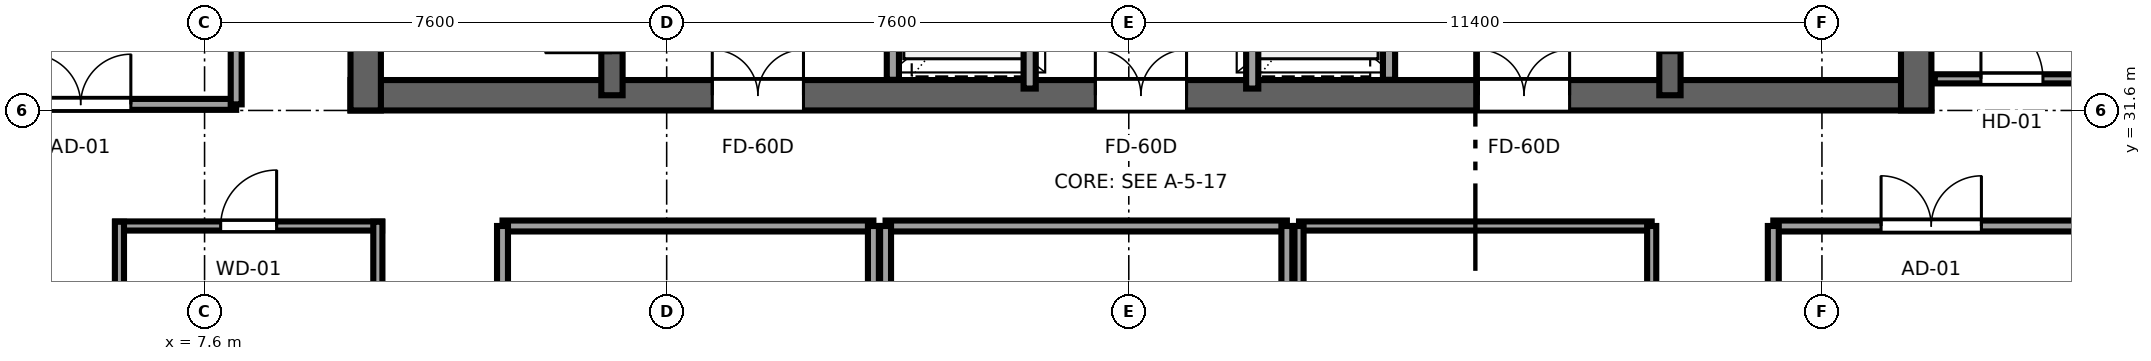
"""IFC4 building model, lengths in metres.
Left out: names, types, materials, properties, quantities, classifications, styles, units other than length and angle.
Written with IfcOpenShell. Run it as: python <this file> out.ifc"""

import sys

from ifc_helpers import new_model, si_unit, direction, frame, frame_2d, origin, place, context, subcontext, project, spatial, rectangle, extrude, source, transform, mapped, element, fill, save


model = new_model("IFC4")
c1 = context("Model", 3, precision=1e-05, world=origin(), true_north=direction((0.0, 1.0)))
c2 = subcontext(c1, "Body", "Model", "MODEL_VIEW")
j1 = project(units=[si_unit("LENGTHUNIT", "METRE"), si_unit("PLANEANGLEUNIT", "RADIAN")], contexts=[c1])
p1 = place(None, origin())
s1 = spatial("IfcSite", under=j1, at=p1, CompositionType="ELEMENT")
p2 = place(p1, origin())
s2 = spatial("IfcBuilding", under=s1, at=p2, CompositionType="ELEMENT")
p3 = place(p2, frame((0.0, 0.0, 259.4)))
s3 = spatial("IfcBuildingStorey", under=s2, at=p3, CompositionType="ELEMENT", Elevation=259.4)
p4 = place(p3, frame((10.0, 31.85, 0.0), z_axis=(0.0, 0.0, 1.0), x_axis=(1.0, 0.0, 0.0)))
e1 = element("IfcWall", 1, at=p4, inside=s3, PredefinedType="SHEAR", context=c2, shape_type="SweptSolid", body=[
    extrude(rectangle(XDim=26.0, YDim=0.5, at=frame_2d((13.0, 0.0))), origin(), (0.0, 0.0, 1.0), 3.55),
])
p5 = place(p4, frame((7.45, 0.0, 0.0), z_axis=(0.0, 0.0, 1.0), x_axis=(-1.0, 0.0, 0.0)))
e2 = element("IfcOpeningElement", 2, at=p5, cuts=e1, PredefinedType="OPENING", context=c2, shape_type="SweptSolid", body=[
    extrude(rectangle(XDim=1.5, YDim=2.04, at=frame_2d((0.75, 1.02))), frame((0.0, 0.26, 0.0), z_axis=(0.0, -1.0, 0.0), x_axis=(1.0, 0.0, 0.0)), (0.0, 0.0, 1.0), 0.52),
])
p6 = place(p4, frame((13.75, 0.0, 0.0), z_axis=(0.0, 0.0, 1.0), x_axis=(-1.0, 0.0, 0.0)))
e3 = element("IfcOpeningElement", 3, at=p6, cuts=e1, PredefinedType="OPENING", context=c2, shape_type="SweptSolid", body=[
    extrude(rectangle(XDim=1.5, YDim=2.04, at=frame_2d((0.75, 1.02))), frame((0.0, 0.26, 0.0), z_axis=(0.0, -1.0, 0.0), x_axis=(1.0, 0.0, 0.0)), (0.0, 0.0, 1.0), 0.52),
])
p7 = place(p4, frame((20.05, 0.0, 0.0), z_axis=(0.0, 0.0, 1.0), x_axis=(-1.0, 0.0, 0.0)))
e4 = element("IfcOpeningElement", 4, at=p7, cuts=e1, PredefinedType="OPENING", context=c2, shape_type="SweptSolid", body=[
    extrude(rectangle(XDim=1.5, YDim=2.04, at=frame_2d((0.75, 1.02))), frame((0.0, 0.26, 0.0), z_axis=(0.0, -1.0, 0.0), x_axis=(1.0, 0.0, 0.0)), (0.0, 0.0, 1.0), 0.52),
])
for number, where, z_axis, x_axis in (
    (5, (10.25, 31.6, 0.0), (0.0, 0.0, 1.0), (0.0, 1.0, 0.0)),
    (6, (35.75, 31.6, 0.0), (0.0, 0.0, 1.0), (0.0, 1.0, 0.0)),
):
    element("IfcWall", number, at=place(p3, frame(where, z_axis=z_axis, x_axis=x_axis)), inside=s3, PredefinedType="SHEAR", context=c2, shape_type="SweptSolid", body=[
        extrude(rectangle(XDim=13.6, YDim=0.5, at=frame_2d((6.8, 0.0))), origin(), (0.0, 0.0, 1.0), 3.55),
    ])
p8 = place(p3, frame((14.3, 31.85, 0.0), z_axis=(0.0, 0.0, 1.0), x_axis=(0.0, 1.0, 0.0)))
e7 = element("IfcWall", 7, at=p8, inside=s3, PredefinedType="SHEAR", context=c2, shape_type="SweptSolid", body=[
    extrude(rectangle(XDim=13.1, YDim=0.35, at=frame_2d((6.55, 0.0))), origin(), (0.0, 0.0, 1.0), 3.55),
])
p9 = place(p8, frame((0.7, 0.0, 0.0)))
e8 = element("IfcOpeningElement", 8, at=p9, cuts=e7, PredefinedType="OPENING", context=c2, shape_type="SweptSolid", body=[
    extrude(rectangle(XDim=1.1, YDim=2.12, at=frame_2d((0.55, 1.06))), frame((0.0, 0.185, 0.0), z_axis=(0.0, -1.0, 0.0), x_axis=(1.0, 0.0, 0.0)), (0.0, 0.0, 1.0), 0.37),
])
p10 = place(p3, frame((31.7, 31.85, 0.0), z_axis=(0.0, 0.0, 1.0), x_axis=(0.0, 1.0, 0.0)))
e9 = element("IfcWall", 9, at=p10, inside=s3, PredefinedType="SHEAR", context=c2, shape_type="SweptSolid", body=[
    extrude(rectangle(XDim=13.1, YDim=0.35, at=frame_2d((6.55, 0.0))), origin(), (0.0, 0.0, 1.0), 3.55),
])
p11 = place(p10, frame((1.8, 0.0, 0.0), z_axis=(0.0, 0.0, 1.0), x_axis=(-1.0, 0.0, 0.0)))
e10 = element("IfcOpeningElement", 10, at=p11, cuts=e9, PredefinedType="OPENING", context=c2, shape_type="SweptSolid", body=[
    extrude(rectangle(XDim=1.1, YDim=2.12, at=frame_2d((0.55, 1.06))), frame((0.0, 0.185, 0.0), z_axis=(0.0, -1.0, 0.0), x_axis=(1.0, 0.0, 0.0)), (0.0, 0.0, 1.0), 0.37),
])
for number, where, z_axis, x_axis in (
    (11, (18.92, 32.104, 0.0), (0.0, 0.0, 1.0), (0.0, 1.0, 0.0)),
    (12, (27.08, 32.104, 0.0), (0.0, 0.0, 1.0), (0.0, 1.0, 0.0)),
):
    element("IfcWall", number, at=place(p3, frame(where, z_axis=z_axis, x_axis=x_axis)), inside=s3, PredefinedType="SOLIDWALL", context=c2, shape_type="SweptSolid", body=[
        extrude(rectangle(XDim=4.046, YDim=0.2, at=frame_2d((2.023, 0.0))), origin(), (0.0, 0.0, 1.0), 3.37),
    ])
p12 = place(p3, frame((21.17, 31.96, 0.0), z_axis=(0.0, 0.0, 1.0), x_axis=(0.0, 1.0, 0.0)))
e13 = element("IfcWall", 13, at=p12, inside=s3, PredefinedType="SOLIDWALL", context=c2, shape_type="SweptSolid", body=[
    extrude(rectangle(XDim=5.08, YDim=0.2, at=frame_2d((2.54, 0.0))), origin(), (0.0, 0.0, 1.0), 3.37),
])
p13 = place(p12, frame((0.74, 0.0, 0.0)))
e14 = element("IfcOpeningElement", 14, at=p13, cuts=e13, PredefinedType="OPENING", context=c2, shape_type="SweptSolid", body=[
    extrude(rectangle(XDim=1.1, YDim=2.12, at=frame_2d((0.55, 1.06))), frame((0.0, 0.11, 0.0), z_axis=(0.0, -1.0, 0.0), x_axis=(1.0, 0.0, 0.0)), (0.0, 0.0, 1.0), 0.22),
])
p14 = place(p12, frame((3.24, 0.0, 0.0)))
e15 = element("IfcOpeningElement", 15, at=p14, cuts=e13, PredefinedType="OPENING", context=c2, shape_type="SweptSolid", body=[
    extrude(rectangle(XDim=1.1, YDim=2.12, at=frame_2d((0.55, 1.06))), frame((0.0, 0.11, 0.0), z_axis=(0.0, -1.0, 0.0), x_axis=(1.0, 0.0, 0.0)), (0.0, 0.0, 1.0), 0.22),
])
p15 = place(p3, frame((24.83, 31.96, 0.0), z_axis=(0.0, 0.0, 1.0), x_axis=(0.0, 1.0, 0.0)))
e16 = element("IfcWall", 16, at=p15, inside=s3, PredefinedType="SOLIDWALL", context=c2, shape_type="SweptSolid", body=[
    extrude(rectangle(XDim=5.08, YDim=0.2, at=frame_2d((2.54, 0.0))), origin(), (0.0, 0.0, 1.0), 3.37),
])
p16 = place(p15, frame((0.74, 0.0, 0.0)))
e17 = element("IfcOpeningElement", 17, at=p16, cuts=e16, PredefinedType="OPENING", context=c2, shape_type="SweptSolid", body=[
    extrude(rectangle(XDim=1.1, YDim=2.12, at=frame_2d((0.55, 1.06))), frame((0.0, 0.11, 0.0), z_axis=(0.0, -1.0, 0.0), x_axis=(1.0, 0.0, 0.0)), (0.0, 0.0, 1.0), 0.22),
])
p17 = place(p15, frame((3.24, 0.0, 0.0)))
e18 = element("IfcOpeningElement", 18, at=p17, cuts=e16, PredefinedType="OPENING", context=c2, shape_type="SweptSolid", body=[
    extrude(rectangle(XDim=1.1, YDim=2.12, at=frame_2d((0.55, 1.06))), frame((0.0, 0.11, 0.0), z_axis=(0.0, -1.0, 0.0), x_axis=(1.0, 0.0, 0.0)), (0.0, 0.0, 1.0), 0.22),
])
p18 = place(p3, frame((12.5, 29.7, 0.0), z_axis=(0.0, 0.0, 1.0), x_axis=(1.0, 0.0, 0.0)))
e19 = element("IfcWall", 19, at=p18, inside=s3, PredefinedType="PARTITIONING", context=c2, shape_type="SweptSolid", body=[
    extrude(rectangle(XDim=6.1, YDim=0.18, at=frame_2d((3.05, 0.0))), origin(), (0.0, 0.0, 1.0), 3.37),
])
for number, where, z_axis, x_axis in (
    (20, (12.5, 22.5, 0.0), (0.0, 0.0, 1.0), (0.0, 1.0, 0.0)),
    (21, (18.6, 22.5, 0.0), (0.0, 0.0, 1.0), (0.0, 1.0, 0.0)),
):
    element("IfcWall", number, at=place(p3, frame(where, z_axis=z_axis, x_axis=x_axis)), inside=s3, PredefinedType="PARTITIONING", context=c2, shape_type="SweptSolid", body=[
        extrude(rectangle(XDim=7.2, YDim=0.18, at=frame_2d((3.6, 0.0))), origin(), (0.0, 0.0, 1.0), 3.37),
    ])
p19 = place(p3, frame((18.8, 29.7, 0.0), z_axis=(0.0, 0.0, 1.0), x_axis=(1.0, 0.0, 0.0)))
e22 = element("IfcWall", 22, at=p19, inside=s3, PredefinedType="PARTITIONING", context=c2, shape_type="SweptSolid", body=[
    extrude(rectangle(XDim=6.6, YDim=0.18, at=frame_2d((3.3, 0.0))), origin(), (0.0, 0.0, 1.0), 3.37),
])
for number, where, z_axis, x_axis in (
    (23, (18.8, 22.5, 0.0), (0.0, 0.0, 1.0), (0.0, 1.0, 0.0)),
    (24, (25.4, 22.5, 0.0), (0.0, 0.0, 1.0), (0.0, 1.0, 0.0)),
):
    element("IfcWall", number, at=place(p3, frame(where, z_axis=z_axis, x_axis=x_axis)), inside=s3, PredefinedType="PARTITIONING", context=c2, shape_type="SweptSolid", body=[
        extrude(rectangle(XDim=7.2, YDim=0.18, at=frame_2d((3.6, 0.0))), origin(), (0.0, 0.0, 1.0), 3.37),
    ])
p20 = place(p3, frame((25.6, 29.7, 0.0), z_axis=(0.0, 0.0, 1.0), x_axis=(1.0, 0.0, 0.0)))
e25 = element("IfcWall", 25, at=p20, inside=s3, PredefinedType="PARTITIONING", context=c2, shape_type="SweptSolid", body=[
    extrude(rectangle(XDim=5.8, YDim=0.15, at=frame_2d((2.9, 0.0))), origin(), (0.0, 0.0, 1.0), 3.37),
])
for number, where, z_axis, x_axis in (
    (26, (25.6, 22.5, 0.0), (0.0, 0.0, 1.0), (0.0, 1.0, 0.0)),
    (27, (31.4, 22.5, 0.0), (0.0, 0.0, 1.0), (0.0, 1.0, 0.0)),
):
    element("IfcWall", number, at=place(p3, frame(where, z_axis=z_axis, x_axis=x_axis)), inside=s3, PredefinedType="PARTITIONING", context=c2, shape_type="SweptSolid", body=[
        extrude(rectangle(XDim=7.2, YDim=0.15, at=frame_2d((3.6, 0.0))), origin(), (0.0, 0.0, 1.0), 3.37),
    ])
p21 = place(p3, frame((6.13, 29.7, 0.0), z_axis=(0.0, 0.0, 1.0), x_axis=(1.0, 0.0, 0.0)))
e28 = element("IfcWall", 28, at=p21, inside=s3, PredefinedType="PARTITIONING", context=c2, shape_type="SweptSolid", body=[
    extrude(rectangle(XDim=4.39, YDim=0.15, at=frame_2d((2.195, 0.0))), origin(), (0.0, 0.0, 1.0), 3.37),
])
p22 = place(p21, frame((1.735, 0.0, 0.0)))
e29 = element("IfcOpeningElement", 29, at=p22, cuts=e28, PredefinedType="OPENING", context=c2, shape_type="SweptSolid", body=[
    extrude(rectangle(XDim=0.92, YDim=2.01, at=frame_2d((0.46, 1.005))), frame((0.0, 0.085, 0.0), z_axis=(0.0, -1.0, 0.0), x_axis=(1.0, 0.0, 0.0)), (0.0, 0.0, 1.0), 0.17),
])
for number, where, z_axis, x_axis in (
    (30, (6.2, 26.43, 0.0), (0.0, 0.0, 1.0), (0.0, 1.0, 0.0)),
    (31, (10.45, 26.43, 0.0), (0.0, 0.0, 1.0), (0.0, 1.0, 0.0)),
):
    element("IfcWall", number, at=place(p3, frame(where, z_axis=z_axis, x_axis=x_axis)), inside=s3, PredefinedType="PARTITIONING", context=c2, shape_type="SweptSolid", body=[
        extrude(rectangle(XDim=3.34, YDim=0.15, at=frame_2d((1.67, 0.0))), origin(), (0.0, 0.0, 1.0), 3.37),
    ])
p23 = place(p3, frame((3.005, 31.7, 0.0), z_axis=(0.0, 0.0, 1.0), x_axis=(1.0, 0.0, 0.0)))
e32 = element("IfcWall", 32, at=p23, inside=s3, PredefinedType="PARTITIONING", context=c2, shape_type="SweptSolid", body=[
    extrude(rectangle(XDim=5.115, YDim=0.18, at=frame_2d((2.558, 0.0))), origin(), (0.0, 0.0, 1.0), 3.37),
])
p24 = place(p23, frame((1.732, 0.0, 0.0)))
e33 = element("IfcOpeningElement", 33, at=p24, cuts=e32, PredefinedType="OPENING", context=c2, shape_type="SweptSolid", body=[
    extrude(rectangle(XDim=1.65, YDim=2.15, at=frame_2d((0.825, 1.075))), frame((0.0, 0.1, 0.0), z_axis=(0.0, -1.0, 0.0), x_axis=(1.0, 0.0, 0.0)), (0.0, 0.0, 1.0), 0.2),
])
p25 = place(p3, frame((8.12, 31.7, 0.0), z_axis=(0.0, 0.0, 1.0), x_axis=(0.0, 1.0, 0.0)))
e34 = element("IfcWall", 34, at=p25, inside=s3, PredefinedType="PARTITIONING", context=c2, shape_type="SweptSolid", body=[
    extrude(rectangle(XDim=6.1, YDim=0.18, at=frame_2d((3.05, 0.0))), origin(), (0.0, 0.0, 1.0), 3.37),
])
p26 = place(p3, frame((36.055, 32.12, 0.0), z_axis=(0.0, 0.0, 1.0), x_axis=(1.0, 0.0, 0.0)))
e35 = element("IfcWall", 35, at=p26, inside=s3, PredefinedType="PARTITIONING", context=c2, shape_type="SweptSolid", body=[
    extrude(rectangle(XDim=2.54, YDim=0.15, at=frame_2d((1.27, 0.0))), origin(), (0.0, 0.0, 1.0), 3.37),
])
p27 = place(p26, frame((0.76, 0.0, 0.0)))
e36 = element("IfcOpeningElement", 36, at=p27, cuts=e35, PredefinedType="OPENING", context=c2, shape_type="SweptSolid", body=[
    extrude(rectangle(XDim=1.02, YDim=2.03, at=frame_2d((0.51, 1.015))), frame((0.0, 0.085, 0.0), z_axis=(0.0, -1.0, 0.0), x_axis=(1.0, 0.0, 0.0)), (0.0, 0.0, 1.0), 0.17),
])
p28 = place(p3, frame((33.4, 29.7, 0.0), z_axis=(0.0, 0.0, 1.0), x_axis=(1.0, 0.0, 0.0)))
e37 = element("IfcWall", 37, at=p28, inside=s3, PredefinedType="PARTITIONING", context=c2, shape_type="SweptSolid", body=[
    extrude(rectangle(XDim=5.195, YDim=0.18, at=frame_2d((2.598, 0.0))), origin(), (0.0, 0.0, 1.0), 3.37),
])
p29 = place(p28, frame((1.772, 0.0, 0.0)))
e38 = element("IfcOpeningElement", 38, at=p29, cuts=e37, PredefinedType="OPENING", context=c2, shape_type="SweptSolid", body=[
    extrude(rectangle(XDim=1.65, YDim=2.15, at=frame_2d((0.825, 1.075))), frame((0.0, 0.1, 0.0), z_axis=(0.0, -1.0, 0.0), x_axis=(1.0, 0.0, 0.0)), (0.0, 0.0, 1.0), 0.2),
])
p30 = place(p3, frame((33.4, 21.9, 0.0), z_axis=(0.0, 0.0, 1.0), x_axis=(0.0, 1.0, 0.0)))
e39 = element("IfcWall", 39, at=p30, inside=s3, PredefinedType="PARTITIONING", context=c2, shape_type="SweptSolid", body=[
    extrude(rectangle(XDim=7.8, YDim=0.18, at=frame_2d((3.9, 0.0))), origin(), (0.0, 0.0, 1.0), 3.37),
])
m1 = source(origin(), c2, "Body", "SweptSolid", [
    extrude(rectangle(XDim=1.1, YDim=2.12, at=frame_2d((0.55, 1.06))), frame((0.0, 0.025, 0.0), z_axis=(0.0, -1.0, 0.0), x_axis=(1.0, 0.0, 0.0)), (0.0, 0.0, 1.0), 0.05),
])
p31 = place(p9, origin())
e40 = element("IfcDoor", 40, at=p31, inside=s3, OperationType="SINGLE_SWING_LEFT", PredefinedType="DOOR", context=c2, shape_type="MappedRepresentation", body=[
    mapped(m1, transform((0.0, 0.0, 0.0), x_axis=(1.0, 0.0, 0.0), y_axis=(0.0, 1.0, 0.0), z_axis=(0.0, 0.0, 1.0), scale=1.0)),
])
fill(e8, e40)
p32 = place(p11, origin())
e41 = element("IfcDoor", 41, at=p32, inside=s3, OperationType="SINGLE_SWING_RIGHT", PredefinedType="DOOR", context=c2, shape_type="MappedRepresentation", body=[
    mapped(m1, transform((0.0, 0.0, 0.0), x_axis=(1.0, 0.0, 0.0), y_axis=(0.0, 1.0, 0.0), z_axis=(0.0, 0.0, 1.0), scale=1.0)),
])
fill(e10, e41)
m2 = source(origin(), c2, "Body", "SweptSolid", [
    extrude(rectangle(XDim=1.5, YDim=2.04, at=frame_2d((0.75, 1.02))), frame((0.0, 0.025, 0.0), z_axis=(0.0, -1.0, 0.0), x_axis=(1.0, 0.0, 0.0)), (0.0, 0.0, 1.0), 0.05),
])
p33 = place(p5, origin())
e42 = element("IfcDoor", 42, at=p33, inside=s3, OperationType="DOUBLE_DOOR_SINGLE_SWING", PredefinedType="DOOR", context=c2, shape_type="MappedRepresentation", body=[
    mapped(m2, transform((0.0, 0.0, 0.0), x_axis=(1.0, 0.0, 0.0), y_axis=(0.0, 1.0, 0.0), z_axis=(0.0, 0.0, 1.0), scale=1.0)),
])
fill(e2, e42)
p34 = place(p6, origin())
e43 = element("IfcDoor", 43, at=p34, inside=s3, OperationType="DOUBLE_DOOR_SINGLE_SWING", PredefinedType="DOOR", context=c2, shape_type="MappedRepresentation", body=[
    mapped(m2, transform((0.0, 0.0, 0.0), x_axis=(1.0, 0.0, 0.0), y_axis=(0.0, 1.0, 0.0), z_axis=(0.0, 0.0, 1.0), scale=1.0)),
])
fill(e3, e43)
p35 = place(p7, origin())
e44 = element("IfcDoor", 44, at=p35, inside=s3, OperationType="DOUBLE_DOOR_SINGLE_SWING", PredefinedType="DOOR", context=c2, shape_type="MappedRepresentation", body=[
    mapped(m2, transform((0.0, 0.0, 0.0), x_axis=(1.0, 0.0, 0.0), y_axis=(0.0, 1.0, 0.0), z_axis=(0.0, 0.0, 1.0), scale=1.0)),
])
fill(e4, e44)
m3 = source(origin(), c2, "Body", "SweptSolid", [
    extrude(rectangle(XDim=0.92, YDim=2.01, at=frame_2d((0.46, 1.005))), frame((0.0, 0.025, 0.0), z_axis=(0.0, -1.0, 0.0), x_axis=(1.0, 0.0, 0.0)), (0.0, 0.0, 1.0), 0.05),
])
p36 = place(p22, origin())
e45 = element("IfcDoor", 45, at=p36, inside=s3, OperationType="SINGLE_SWING_RIGHT", PredefinedType="DOOR", context=c2, shape_type="MappedRepresentation", body=[
    mapped(m3, transform((0.0, 0.0, 0.0), x_axis=(1.0, 0.0, 0.0), y_axis=(0.0, 1.0, 0.0), z_axis=(0.0, 0.0, 1.0), scale=1.0)),
])
fill(e29, e45)
m4 = source(origin(), c2, "Body", "SweptSolid", [
    extrude(rectangle(XDim=1.65, YDim=2.15, at=frame_2d((0.825, 1.075))), frame((0.0, 0.025, 0.0), z_axis=(0.0, -1.0, 0.0), x_axis=(1.0, 0.0, 0.0)), (0.0, 0.0, 1.0), 0.05),
])
p37 = place(p24, origin())
e46 = element("IfcDoor", 46, at=p37, inside=s3, OperationType="DOUBLE_DOOR_SINGLE_SWING", PredefinedType="DOOR", context=c2, shape_type="MappedRepresentation", body=[
    mapped(m4, transform((0.0, 0.0, 0.0), x_axis=(1.0, 0.0, 0.0), y_axis=(0.0, 1.0, 0.0), z_axis=(0.0, 0.0, 1.0), scale=1.0)),
])
fill(e33, e46)
m5 = source(origin(), c2, "Body", "SweptSolid", [
    extrude(rectangle(XDim=1.02, YDim=2.03, at=frame_2d((0.51, 1.015))), frame((0.0, 0.025, 0.0), z_axis=(0.0, -1.0, 0.0), x_axis=(1.0, 0.0, 0.0)), (0.0, 0.0, 1.0), 0.05),
])
p38 = place(p27, origin())
e47 = element("IfcDoor", 47, at=p38, inside=s3, OperationType="SINGLE_SWING_LEFT", PredefinedType="DOOR", context=c2, shape_type="MappedRepresentation", body=[
    mapped(m5, transform((0.0, 0.0, 0.0), x_axis=(1.0, 0.0, 0.0), y_axis=(0.0, 1.0, 0.0), z_axis=(0.0, 0.0, 1.0), scale=1.0)),
])
fill(e36, e47)
p39 = place(p29, origin())
e48 = element("IfcDoor", 48, at=p39, inside=s3, OperationType="DOUBLE_DOOR_SINGLE_SWING", PredefinedType="DOOR", context=c2, shape_type="MappedRepresentation", body=[
    mapped(m4, transform((0.0, 0.0, 0.0), x_axis=(1.0, 0.0, 0.0), y_axis=(0.0, 1.0, 0.0), z_axis=(0.0, 0.0, 1.0), scale=1.0)),
])
fill(e38, e48)
save(model, sys.argv[1])
